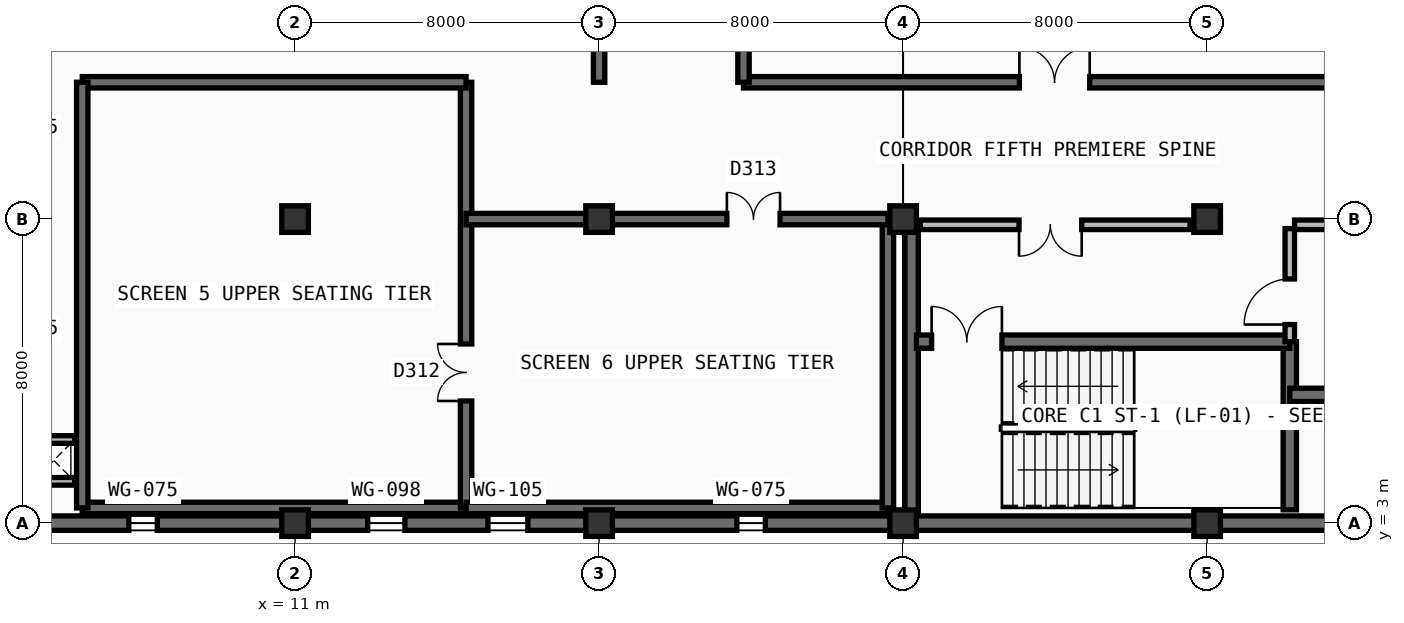
"""IFC4 building model, lengths in metres.
Left out: names, types, materials, properties, quantities, classifications, styles, units other than length and angle.
Written with IfcOpenShell. Run it as: python <this file> out.ifc"""

import sys

from ifc_helpers import new_model, si_unit, direction, frame, frame_2d, origin, origin_2d, place, context, subcontext, project, spatial, rectangle, extrude, element, fill, save


model = new_model("IFC4")
c1 = context("Model", 3, precision=1e-05, world=origin(), true_north=direction((0.0, 1.0)))
c2 = subcontext(c1, "Body", "Model", "MODEL_VIEW")
j1 = project(units=[si_unit("LENGTHUNIT", "METRE"), si_unit("PLANEANGLEUNIT", "RADIAN")], contexts=[c1])
p1 = place(None, origin())
s1 = spatial("IfcSite", under=j1, at=p1, CompositionType="ELEMENT")
p2 = place(p1, origin())
s2 = spatial("IfcBuilding", under=s1, at=p2, CompositionType="ELEMENT")
p3 = place(p2, frame((0.0, 0.0, 23.4)))
s3 = spatial("IfcBuildingStorey", under=s2, at=p3, CompositionType="ELEMENT", Elevation=23.4)
for number, where, z_axis, x_axis in (
    (1, (11.0, 3.0, 0.0), (0.0, 0.0, 1.0), (1.0, 0.0, 0.0)),
    (2, (11.0, 11.0, 0.0), (0.0, 0.0, 1.0), (1.0, 0.0, 0.0)),
    (3, (19.0, 3.0, 0.0), (0.0, 0.0, 1.0), (1.0, 0.0, 0.0)),
    (4, (19.0, 11.0, 0.0), (0.0, 0.0, 1.0), (1.0, 0.0, 0.0)),
    (5, (27.0, 3.0, 0.0), (0.0, 0.0, 1.0), (1.0, 0.0, 0.0)),
    (6, (27.0, 11.0, 0.0), (0.0, 0.0, 1.0), (1.0, 0.0, 0.0)),
    (7, (35.0, 3.0, 0.0), (0.0, 0.0, 1.0), (1.0, 0.0, 0.0)),
    (8, (35.0, 11.0, 0.0), (0.0, 0.0, 1.0), (1.0, 0.0, 0.0)),
):
    element("IfcColumn", number, at=place(p3, frame(where, z_axis=z_axis, x_axis=x_axis)), inside=s3, PredefinedType="COLUMN", context=c2, shape_type="SweptSolid", body=[
        extrude(rectangle(XDim=0.7, YDim=0.7, at=origin_2d()), origin(), (0.0, 0.0, 1.0), 4.5),
    ])
for number, where, z_axis, x_axis in (
    (9, (43.0, 3.0, 0.0), (0.0, 0.0, 1.0), (-1.0, 0.0, 0.0)),
    (10, (35.0, 3.0, 0.0), (0.0, 0.0, 1.0), (-1.0, 0.0, 0.0)),
):
    element("IfcWall", number, at=place(p3, frame(where, z_axis=z_axis, x_axis=x_axis)), inside=s3, PredefinedType="SOLIDWALL", context=c2, shape_type="SweptSolid", body=[
        extrude(rectangle(XDim=8.0, YDim=0.38, at=frame_2d((4.0, 0.0))), origin(), (0.0, 0.0, 1.0), 4.5),
    ])
p4 = place(p3, frame((27.0, 3.0, 0.0), z_axis=(0.0, 0.0, 1.0), x_axis=(-1.0, 0.0, 0.0)))
e11 = element("IfcWall", 11, at=p4, inside=s3, PredefinedType="SOLIDWALL", context=c2, shape_type="SweptSolid", body=[
    extrude(rectangle(XDim=8.0, YDim=0.38, at=frame_2d((4.0, 0.0))), origin(), (0.0, 0.0, 1.0), 4.5),
])
p5 = place(p4, frame((3.625, 0.0, 1.05)))
e12 = element("IfcOpeningElement", 12, at=p5, cuts=e11, PredefinedType="OPENING", context=c2, shape_type="SweptSolid", body=[
    extrude(rectangle(XDim=0.75, YDim=1.3, at=frame_2d((0.375, 0.65))), frame((0.0, 0.2, 0.0), z_axis=(0.0, -1.0, 0.0), x_axis=(1.0, 0.0, 0.0)), (0.0, 0.0, 1.0), 0.4),
])
p6 = place(p3, frame((19.0, 3.0, 0.0), z_axis=(0.0, 0.0, 1.0), x_axis=(-1.0, 0.0, 0.0)))
e13 = element("IfcWall", 13, at=p6, inside=s3, PredefinedType="SOLIDWALL", context=c2, shape_type="SweptSolid", body=[
    extrude(rectangle(XDim=8.0, YDim=0.38, at=frame_2d((4.0, 0.0))), origin(), (0.0, 0.0, 1.0), 4.5),
])
p7 = place(p6, frame((1.875, 0.0, 1.05)))
e14 = element("IfcOpeningElement", 14, at=p7, cuts=e13, PredefinedType="OPENING", context=c2, shape_type="SweptSolid", body=[
    extrude(rectangle(XDim=1.05, YDim=1.7, at=frame_2d((0.525, 0.85))), frame((0.0, 0.2, 0.0), z_axis=(0.0, -1.0, 0.0), x_axis=(1.0, 0.0, 0.0)), (0.0, 0.0, 1.0), 0.4),
])
p8 = place(p6, frame((5.11, 0.0, 1.05)))
e15 = element("IfcOpeningElement", 15, at=p8, cuts=e13, PredefinedType="OPENING", context=c2, shape_type="SweptSolid", body=[
    extrude(rectangle(XDim=0.98, YDim=1.6, at=frame_2d((0.49, 0.8))), frame((0.0, 0.2, 0.0), z_axis=(0.0, -1.0, 0.0), x_axis=(1.0, 0.0, 0.0)), (0.0, 0.0, 1.0), 0.4),
])
p9 = place(p3, frame((11.0, 3.0, 0.0), z_axis=(0.0, 0.0, 1.0), x_axis=(-1.0, 0.0, 0.0)))
e16 = element("IfcWall", 16, at=p9, inside=s3, PredefinedType="SOLIDWALL", context=c2, shape_type="SweptSolid", body=[
    extrude(rectangle(XDim=8.0, YDim=0.38, at=frame_2d((4.0, 0.0))), origin(), (0.0, 0.0, 1.0), 4.5),
])
p10 = place(p9, frame((3.625, 0.0, 1.05)))
e17 = element("IfcOpeningElement", 17, at=p10, cuts=e16, PredefinedType="OPENING", context=c2, shape_type="SweptSolid", body=[
    extrude(rectangle(XDim=0.75, YDim=1.3, at=frame_2d((0.375, 0.65))), frame((0.0, 0.2, 0.0), z_axis=(0.0, -1.0, 0.0), x_axis=(1.0, 0.0, 0.0)), (0.0, 0.0, 1.0), 0.4),
])
p11 = place(p3, frame((27.225, 3.2, 0.0), z_axis=(0.0, 0.0, 1.0), x_axis=(0.0, 1.0, 0.0)))
e18 = element("IfcWall", 18, at=p11, inside=s3, PredefinedType="SHEAR", context=c2, shape_type="SweptSolid", body=[
    extrude(rectangle(XDim=7.6, YDim=0.35, at=frame_2d((3.8, 0.0))), origin(), (0.0, 0.0, 1.0), 4.1),
])
p12 = place(p3, frame((37.175, 3.35, 0.0), z_axis=(0.0, 0.0, 1.0), x_axis=(0.0, 1.0, 0.0)))
e19 = element("IfcWall", 19, at=p12, inside=s3, PredefinedType="SHEAR", context=c2, shape_type="SweptSolid", body=[
    extrude(rectangle(XDim=4.425, YDim=0.35, at=frame_2d((2.212, 0.0))), origin(), (0.0, 0.0, 1.0), 4.1),
])
p13 = place(p3, frame((27.35, 7.775, 0.0), z_axis=(0.0, 0.0, 1.0), x_axis=(1.0, 0.0, 0.0)))
e20 = element("IfcWall", 20, at=p13, inside=s3, PredefinedType="SHEAR", context=c2, shape_type="SweptSolid", body=[
    extrude(rectangle(XDim=9.825, YDim=0.35, at=frame_2d((4.913, 0.0))), origin(), (0.0, 0.0, 1.0), 4.1),
])
p14 = place(p13, frame((0.4, 0.0, 0.0)))
e21 = element("IfcOpeningElement", 21, at=p14, cuts=e20, PredefinedType="OPENING", context=c2, shape_type="SweptSolid", body=[
    extrude(rectangle(XDim=1.85, YDim=2.25, at=frame_2d((0.925, 1.125))), frame((0.0, 0.185, 0.0), z_axis=(0.0, -1.0, 0.0), x_axis=(1.0, 0.0, 0.0)), (0.0, 0.0, 1.0), 0.37),
])
p15 = place(p3, frame((37.175, 6.375, 0.0), z_axis=(0.0, 0.0, 1.0), x_axis=(1.0, 0.0, 0.0)))
e22 = element("IfcWall", 22, at=p15, inside=s3, PredefinedType="SHEAR", context=c2, shape_type="SweptSolid", body=[
    extrude(rectangle(XDim=5.475, YDim=0.35, at=frame_2d((2.737, 0.0))), origin(), (0.0, 0.0, 1.0), 4.1),
])
p16 = place(p15, frame((1.4, 0.0, 0.0)))
e23 = element("IfcOpeningElement", 23, at=p16, cuts=e22, PredefinedType="OPENING", context=c2, shape_type="SweptSolid", body=[
    extrude(rectangle(XDim=1.25, YDim=2.25, at=frame_2d((0.625, 1.125))), frame((0.0, 0.185, 0.0), z_axis=(0.0, -1.0, 0.0), x_axis=(1.0, 0.0, 0.0)), (0.0, 0.0, 1.0), 0.37),
])
p17 = place(p3, frame((37.175, 7.775, 0.0), z_axis=(0.0, 0.0, 1.0), x_axis=(0.0, 1.0, 0.0)))
e24 = element("IfcWall", 24, at=p17, inside=s3, PredefinedType="PARTITIONING", context=c2, shape_type="SweptSolid", body=[
    extrude(rectangle(XDim=2.975, YDim=0.25, at=frame_2d((1.488, 0.0))), origin(), (0.0, 0.0, 1.0), 4.1),
])
p18 = place(p17, frame((0.45, 0.0, 0.0)))
e25 = element("IfcOpeningElement", 25, at=p18, cuts=e24, PredefinedType="OPENING", context=c2, shape_type="SweptSolid", body=[
    extrude(rectangle(XDim=1.2, YDim=2.2, at=frame_2d((0.6, 1.1))), frame((0.0, 0.135, 0.0), z_axis=(0.0, -1.0, 0.0), x_axis=(1.0, 0.0, 0.0)), (0.0, 0.0, 1.0), 0.27),
])
p19 = place(p3, frame((27.45, 10.85, 0.0), z_axis=(0.0, 0.0, 1.0), x_axis=(1.0, 0.0, 0.0)))
e26 = element("IfcWall", 26, at=p19, inside=s3, PredefinedType="PARTITIONING", context=c2, shape_type="SweptSolid", body=[
    extrude(rectangle(XDim=7.1, YDim=0.25, at=frame_2d((3.55, 0.0))), origin(), (0.0, 0.0, 1.0), 3.435),
])
p20 = place(p19, frame((2.6, 0.0, 0.0)))
e27 = element("IfcOpeningElement", 27, at=p20, cuts=e26, PredefinedType="OPENING", context=c2, shape_type="SweptSolid", body=[
    extrude(rectangle(XDim=1.65, YDim=2.25, at=frame_2d((0.825, 1.125))), frame((0.0, 0.135, 0.0), z_axis=(0.0, -1.0, 0.0), x_axis=(1.0, 0.0, 0.0)), (0.0, 0.0, 1.0), 0.27),
])
p21 = place(p3, frame((37.3, 10.85, 0.0), z_axis=(0.0, 0.0, 1.0), x_axis=(1.0, 0.0, 0.0)))
e28 = element("IfcWall", 28, at=p21, inside=s3, PredefinedType="PARTITIONING", context=c2, shape_type="SweptSolid", body=[
    extrude(rectangle(XDim=5.25, YDim=0.25, at=frame_2d((2.625, 0.0))), origin(), (0.0, 0.0, 1.0), 3.435),
])
p22 = place(p21, frame((1.85, 0.0, 0.0)))
e29 = element("IfcOpeningElement", 29, at=p22, cuts=e28, PredefinedType="OPENING", context=c2, shape_type="SweptSolid", body=[
    extrude(rectangle(XDim=1.5, YDim=2.2, at=frame_2d((0.75, 1.1))), frame((0.0, 0.135, 0.0), z_axis=(0.0, -1.0, 0.0), x_axis=(1.0, 0.0, 0.0)), (0.0, 0.0, 1.0), 0.27),
])
p23 = place(p3, frame((5.4, 3.4, 0.0), z_axis=(0.0, 0.0, 1.0), x_axis=(1.0, 0.0, 0.0)))
e30 = element("IfcWall", 30, at=p23, inside=s3, PredefinedType="SHEAR", context=c2, shape_type="SweptSolid", body=[
    extrude(rectangle(XDim=10.1, YDim=0.3, at=frame_2d((5.05, 0.0))), origin(), (0.0, 0.0, 1.0), 4.1),
])
p24 = place(p3, frame((15.5, 3.4, 0.0), z_axis=(0.0, 0.0, 1.0), x_axis=(0.0, 1.0, 0.0)))
e31 = element("IfcWall", 31, at=p24, inside=s3, PredefinedType="SHEAR", context=c2, shape_type="SweptSolid", body=[
    extrude(rectangle(XDim=11.2, YDim=0.3, at=frame_2d((5.6, 0.0))), origin(), (0.0, 0.0, 1.0), 4.1),
])
p25 = place(p24, frame((2.814, 0.0, 0.0)))
e32 = element("IfcOpeningElement", 32, at=p25, cuts=e31, PredefinedType="OPENING", context=c2, shape_type="SweptSolid", body=[
    extrude(rectangle(XDim=1.5, YDim=2.2, at=frame_2d((0.75, 1.1))), frame((0.0, 0.16, 0.0), z_axis=(0.0, -1.0, 0.0), x_axis=(1.0, 0.0, 0.0)), (0.0, 0.0, 1.0), 0.32),
])
p26 = place(p3, frame((5.4, 14.6, 0.0), z_axis=(0.0, 0.0, 1.0), x_axis=(1.0, 0.0, 0.0)))
e33 = element("IfcWall", 33, at=p26, inside=s3, PredefinedType="SHEAR", context=c2, shape_type="SweptSolid", body=[
    extrude(rectangle(XDim=10.1, YDim=0.3, at=frame_2d((5.05, 0.0))), origin(), (0.0, 0.0, 1.0), 4.1),
])
p27 = place(p3, frame((5.4, 3.4, 0.0), z_axis=(0.0, 0.0, 1.0), x_axis=(0.0, 1.0, 0.0)))
e34 = element("IfcWall", 34, at=p27, inside=s3, PredefinedType="SHEAR", context=c2, shape_type="SweptSolid", body=[
    extrude(rectangle(XDim=11.2, YDim=0.3, at=frame_2d((5.6, 0.0))), origin(), (0.0, 0.0, 1.0), 4.1),
])
p28 = place(p3, frame((15.5, 3.4, 0.0), z_axis=(0.0, 0.0, 1.0), x_axis=(1.0, 0.0, 0.0)))
e35 = element("IfcWall", 35, at=p28, inside=s3, PredefinedType="SHEAR", context=c2, shape_type="SweptSolid", body=[
    extrude(rectangle(XDim=11.1, YDim=0.3, at=frame_2d((5.55, 0.0))), origin(), (0.0, 0.0, 1.0), 4.1),
])
p29 = place(p3, frame((26.6, 3.4, 0.0), z_axis=(0.0, 0.0, 1.0), x_axis=(0.0, 1.0, 0.0)))
e36 = element("IfcWall", 36, at=p29, inside=s3, PredefinedType="SHEAR", context=c2, shape_type="SweptSolid", body=[
    extrude(rectangle(XDim=7.6, YDim=0.3, at=frame_2d((3.8, 0.0))), origin(), (0.0, 0.0, 1.0), 4.1),
])
p30 = place(p3, frame((15.5, 11.0, 0.0), z_axis=(0.0, 0.0, 1.0), x_axis=(1.0, 0.0, 0.0)))
e37 = element("IfcWall", 37, at=p30, inside=s3, PredefinedType="SHEAR", context=c2, shape_type="SweptSolid", body=[
    extrude(rectangle(XDim=11.1, YDim=0.3, at=frame_2d((5.55, 0.0))), origin(), (0.0, 0.0, 1.0), 4.1),
])
p31 = place(p30, frame((6.862, 0.0, 0.0)))
e38 = element("IfcOpeningElement", 38, at=p31, cuts=e37, PredefinedType="OPENING", context=c2, shape_type="SweptSolid", body=[
    extrude(rectangle(XDim=1.4, YDim=2.22, at=frame_2d((0.7, 1.11))), frame((0.0, 0.16, 0.0), z_axis=(0.0, -1.0, 0.0), x_axis=(1.0, 0.0, 0.0)), (0.0, 0.0, 1.0), 0.32),
])
p32 = place(p3, frame((19.0, 14.6, 0.0), z_axis=(0.0, 0.0, 1.0), x_axis=(0.0, 1.0, 0.0)))
e39 = element("IfcWall", 39, at=p32, inside=s3, PredefinedType="SHEAR", context=c2, shape_type="SweptSolid", body=[
    extrude(rectangle(XDim=12.0, YDim=0.3, at=frame_2d((6.0, 0.0))), origin(), (0.0, 0.0, 1.0), 4.1),
])
p33 = place(p32, frame((7.413, 0.0, 0.0)))
e40 = element("IfcOpeningElement", 40, at=p33, cuts=e39, PredefinedType="OPENING", context=c2, shape_type="SweptSolid", body=[
    extrude(rectangle(XDim=1.8, YDim=2.3, at=frame_2d((0.9, 1.15))), frame((0.0, 0.16, 0.0), z_axis=(0.0, -1.0, 0.0), x_axis=(1.0, 0.0, 0.0)), (0.0, 0.0, 1.0), 0.32),
])
p34 = place(p3, frame((22.8, 14.6, 0.0), z_axis=(0.0, 0.0, 1.0), x_axis=(1.0, 0.0, 0.0)))
e41 = element("IfcWall", 41, at=p34, inside=s3, PredefinedType="SHEAR", context=c2, shape_type="SweptSolid", body=[
    extrude(rectangle(XDim=19.8, YDim=0.3, at=frame_2d((9.9, 0.0))), origin(), (0.0, 0.0, 1.0), 4.1),
])
p35 = place(p34, frame((7.26, 0.0, 0.0)))
e42 = element("IfcOpeningElement", 42, at=p35, cuts=e41, PredefinedType="OPENING", context=c2, shape_type="SweptSolid", body=[
    extrude(rectangle(XDim=1.85, YDim=2.25, at=frame_2d((0.925, 1.125))), frame((0.0, 0.16, 0.0), z_axis=(0.0, -1.0, 0.0), x_axis=(1.0, 0.0, 0.0)), (0.0, 0.0, 1.0), 0.32),
])
p36 = place(p3, frame((22.8, 14.6, 0.0), z_axis=(0.0, 0.0, 1.0), x_axis=(0.0, 1.0, 0.0)))
e43 = element("IfcWall", 43, at=p36, inside=s3, PredefinedType="SHEAR", context=c2, shape_type="SweptSolid", body=[
    extrude(rectangle(XDim=12.0, YDim=0.3, at=frame_2d((6.0, 0.0))), origin(), (0.0, 0.0, 1.0), 4.1),
])
for number, where, z_axis, x_axis in (
    (44, (4.1, 4.1, 0.0), (0.0, 0.0, 1.0), (1.0, 0.0, 0.0)),
    (45, (4.1, 5.2, 0.0), (0.0, 0.0, 1.0), (1.0, 0.0, 0.0)),
):
    element("IfcWall", number, at=place(p3, frame(where, z_axis=z_axis, x_axis=x_axis)), inside=s3, PredefinedType="PARTITIONING", context=c2, shape_type="SweptSolid", body=[
        extrude(rectangle(XDim=1.1, YDim=0.2, at=frame_2d((0.55, 0.0))), origin(), (0.0, 0.0, 1.0), 4.1),
    ])
p37 = place(p5, origin())
e46 = element("IfcWindow", 46, at=p37, inside=s3, PartitioningType="SINGLE_PANEL", PredefinedType="WINDOW", context=c2, shape_type="SweptSolid", body=[
    extrude(rectangle(XDim=0.75, YDim=1.3, at=frame_2d((0.375, 0.65))), frame((0.0, 0.03, 0.0), z_axis=(0.0, -1.0, 0.0), x_axis=(1.0, 0.0, 0.0)), (0.0, 0.0, 1.0), 0.06),
])
fill(e12, e46)
p38 = place(p7, origin())
e47 = element("IfcWindow", 47, at=p38, inside=s3, PartitioningType="SINGLE_PANEL", PredefinedType="WINDOW", context=c2, shape_type="SweptSolid", body=[
    extrude(rectangle(XDim=1.05, YDim=1.7, at=frame_2d((0.525, 0.85))), frame((0.0, 0.03, 0.0), z_axis=(0.0, -1.0, 0.0), x_axis=(1.0, 0.0, 0.0)), (0.0, 0.0, 1.0), 0.06),
])
fill(e14, e47)
p39 = place(p8, origin())
e48 = element("IfcWindow", 48, at=p39, inside=s3, PartitioningType="SINGLE_PANEL", PredefinedType="WINDOW", context=c2, shape_type="SweptSolid", body=[
    extrude(rectangle(XDim=0.98, YDim=1.6, at=frame_2d((0.49, 0.8))), frame((0.0, 0.03, 0.0), z_axis=(0.0, -1.0, 0.0), x_axis=(1.0, 0.0, 0.0)), (0.0, 0.0, 1.0), 0.06),
])
fill(e15, e48)
p40 = place(p10, origin())
e49 = element("IfcWindow", 49, at=p40, inside=s3, PartitioningType="SINGLE_PANEL", PredefinedType="WINDOW", context=c2, shape_type="SweptSolid", body=[
    extrude(rectangle(XDim=0.75, YDim=1.3, at=frame_2d((0.375, 0.65))), frame((0.0, 0.03, 0.0), z_axis=(0.0, -1.0, 0.0), x_axis=(1.0, 0.0, 0.0)), (0.0, 0.0, 1.0), 0.06),
])
fill(e17, e49)
p41 = place(p14, origin())
e50 = element("IfcDoor", 50, at=p41, inside=s3, OperationType="DOUBLE_DOOR_SINGLE_SWING", PredefinedType="DOOR", context=c2, shape_type="SweptSolid", body=[
    extrude(rectangle(XDim=1.85, YDim=2.25, at=frame_2d((0.925, 1.125))), frame((0.0, 0.025, 0.0), z_axis=(0.0, -1.0, 0.0), x_axis=(1.0, 0.0, 0.0)), (0.0, 0.0, 1.0), 0.05),
])
fill(e21, e50)
p42 = place(p18, origin())
e51 = element("IfcDoor", 51, at=p42, inside=s3, OperationType="SINGLE_SWING_LEFT", PredefinedType="DOOR", context=c2, shape_type="SweptSolid", body=[
    extrude(rectangle(XDim=1.2, YDim=2.2, at=frame_2d((0.6, 1.1))), frame((0.0, 0.025, 0.0), z_axis=(0.0, -1.0, 0.0), x_axis=(1.0, 0.0, 0.0)), (0.0, 0.0, 1.0), 0.05),
])
fill(e25, e51)
p43 = place(p20, frame((1.65, 0.0, 0.0), z_axis=(0.0, 0.0, 1.0), x_axis=(-1.0, 0.0, 0.0)))
e52 = element("IfcDoor", 52, at=p43, inside=s3, OperationType="DOUBLE_DOOR_SINGLE_SWING", PredefinedType="DOOR", context=c2, shape_type="SweptSolid", body=[
    extrude(rectangle(XDim=1.65, YDim=2.25, at=frame_2d((0.825, 1.125))), frame((0.0, 0.025, 0.0), z_axis=(0.0, -1.0, 0.0), x_axis=(1.0, 0.0, 0.0)), (0.0, 0.0, 1.0), 0.05),
])
fill(e27, e52)
p44 = place(p25, origin())
e53 = element("IfcDoor", 53, at=p44, inside=s3, OperationType="DOUBLE_DOOR_SINGLE_SWING", PredefinedType="DOOR", context=c2, shape_type="SweptSolid", body=[
    extrude(rectangle(XDim=1.5, YDim=2.2, at=frame_2d((0.75, 1.1))), frame((0.0, 0.025, 0.0), z_axis=(0.0, -1.0, 0.0), x_axis=(1.0, 0.0, 0.0)), (0.0, 0.0, 1.0), 0.05),
])
fill(e32, e53)
p45 = place(p31, origin())
e54 = element("IfcDoor", 54, at=p45, inside=s3, OperationType="DOUBLE_DOOR_SINGLE_SWING", PredefinedType="DOOR", context=c2, shape_type="SweptSolid", body=[
    extrude(rectangle(XDim=1.4, YDim=2.22, at=frame_2d((0.7, 1.11))), frame((0.0, 0.025, 0.0), z_axis=(0.0, -1.0, 0.0), x_axis=(1.0, 0.0, 0.0)), (0.0, 0.0, 1.0), 0.05),
])
fill(e38, e54)
p46 = place(p35, origin())
e55 = element("IfcDoor", 55, at=p46, inside=s3, OperationType="DOUBLE_DOOR_SINGLE_SWING", PredefinedType="DOOR", context=c2, shape_type="SweptSolid", body=[
    extrude(rectangle(XDim=1.85, YDim=2.25, at=frame_2d((0.925, 1.125))), frame((0.0, 0.025, 0.0), z_axis=(0.0, -1.0, 0.0), x_axis=(1.0, 0.0, 0.0)), (0.0, 0.0, 1.0), 0.05),
])
fill(e42, e55)
save(model, sys.argv[1])
